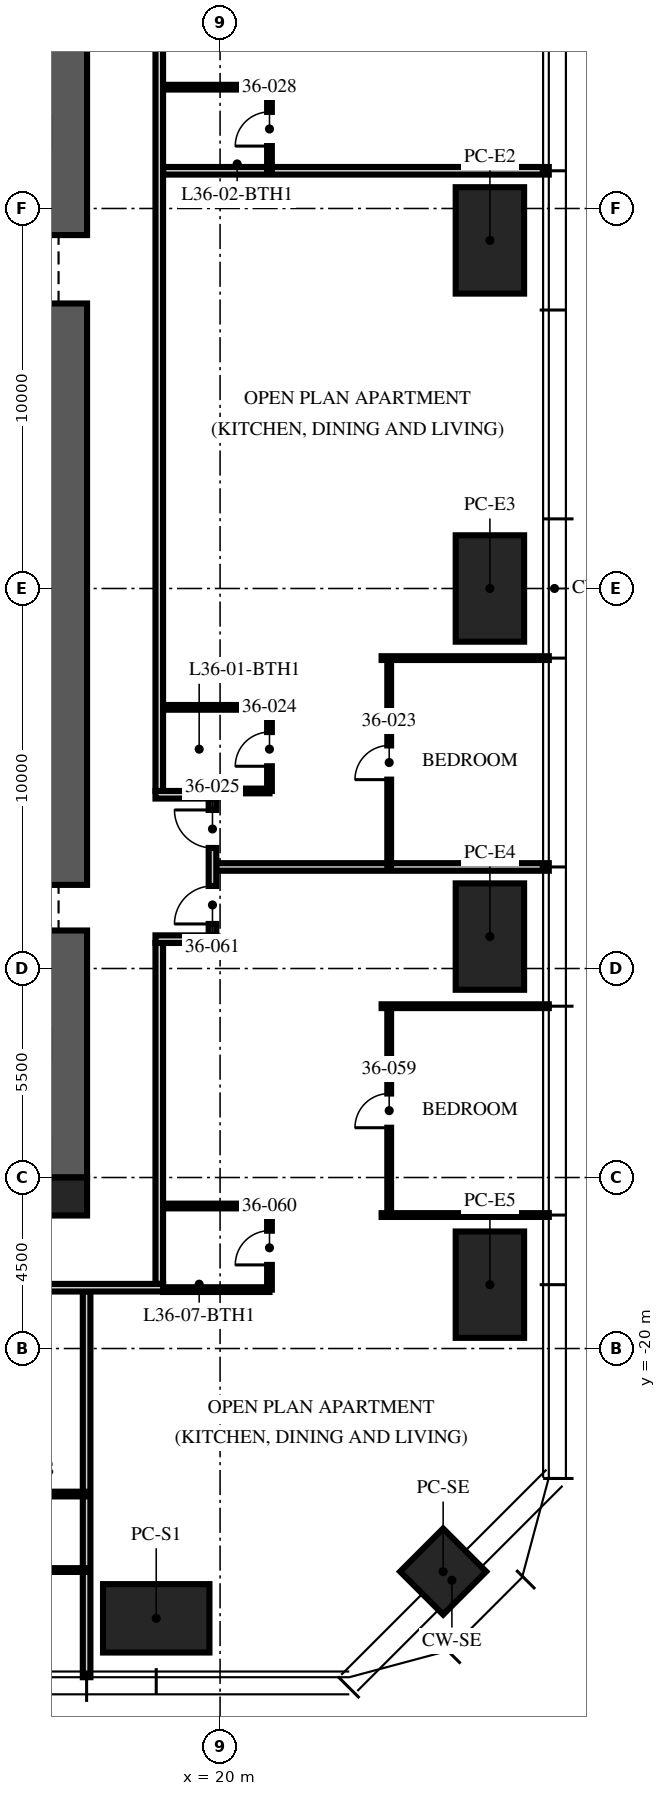
"""IFC4 building model, lengths in metres.
Left out: names, types, materials, properties, quantities, classifications, styles, units other than length and angle.
Written with IfcOpenShell. Run it as: python <this file> out.ifc"""

import sys

from ifc_helpers import new_model, si_unit, direction, frame, frame_2d, origin, origin_2d, place, context, subcontext, project, spatial, rectangle, extrude, element, fill, save


model = new_model("IFC4")
c1 = context("Model", 3, precision=1e-05, world=origin(), true_north=direction((0.0, 1.0)))
c2 = subcontext(c1, "Body", "Model", "MODEL_VIEW")
j1 = project(units=[si_unit("LENGTHUNIT", "METRE"), si_unit("PLANEANGLEUNIT", "RADIAN")], contexts=[c1])
p1 = place(None, origin())
s1 = spatial("IfcSite", under=j1, at=p1, CompositionType="ELEMENT")
p2 = place(p1, origin())
s2 = spatial("IfcBuilding", under=s1, at=p2, CompositionType="ELEMENT")
p3 = place(p2, frame((0.0, 0.0, 144.75)))
s3 = spatial("IfcBuildingStorey", under=s2, at=p3, CompositionType="ELEMENT", Elevation=144.75)
p4 = place(p3, frame((15.5, -15.5, -0.25), z_axis=(0.0, 0.0, 1.0), x_axis=(0.0, 1.0, 0.0)))
e1 = element("IfcWall", 1, at=p4, inside=s3, PredefinedType="SHEAR", context=c2, shape_type="SweptSolid", body=[
    extrude(rectangle(XDim=31.0, YDim=2.0, at=frame_2d((15.5, 0.0))), origin(), (0.0, 0.0, 1.0), 3.75),
])
p5 = place(p4, frame((6.5, 0.0, 0.25)))
e2 = element("IfcOpeningElement", 2, at=p5, cuts=e1, PredefinedType="OPENING", context=c2, shape_type="SweptSolid", body=[
    extrude(rectangle(XDim=1.2, YDim=2.1, at=frame_2d((0.6, 1.05))), frame((0.0, 1.01, 0.0), z_axis=(0.0, -1.0, 0.0), x_axis=(1.0, 0.0, 0.0)), (0.0, 0.0, 1.0), 2.02),
])
p6 = place(p4, frame((23.0, 0.0, 0.25)))
e3 = element("IfcOpeningElement", 3, at=p6, cuts=e1, PredefinedType="OPENING", context=c2, shape_type="SweptSolid", body=[
    extrude(rectangle(XDim=1.8, YDim=2.1, at=frame_2d((0.9, 1.05))), frame((0.0, 1.01, 0.0), z_axis=(0.0, -1.0, 0.0), x_axis=(1.0, 0.0, 0.0)), (0.0, 0.0, 1.0), 2.02),
])
p7 = place(p3, frame((16.0, -16.0, -0.25), z_axis=(0.0, 0.0, 1.0), x_axis=(1.0, 0.0, 0.0)))
e4 = element("IfcColumn", 4, at=p7, inside=s3, PredefinedType="COLUMN", context=c2, shape_type="SweptSolid", body=[
    extrude(rectangle(XDim=1.0, YDim=1.0, at=origin_2d()), origin(), (0.0, 0.0, 1.0), 3.75),
])
for number, where, z_axis, x_axis in (
    (5, (27.1, 9.16, 0.0), (0.0, 0.0, 1.0), (0.0, 1.0, 0.0)),
    (6, (27.1, 0.0, 0.0), (0.0, 0.0, 1.0), (0.0, 1.0, 0.0)),
    (7, (27.1, -9.16, 0.0), (0.0, 0.0, 1.0), (0.0, 1.0, 0.0)),
    (8, (27.1, -18.32, 0.0), (0.0, 0.0, 1.0), (0.0, 1.0, 0.0)),
    (9, (18.32, -27.1, 0.0), (0.0, 0.0, 1.0), (1.0, 0.0, 0.0)),
):
    element("IfcColumn", number, at=place(p3, frame(where, z_axis=z_axis, x_axis=x_axis)), inside=s3, PredefinedType="COLUMN", context=c2, shape_type="SweptSolid", body=[
        extrude(rectangle(XDim=2.8, YDim=1.8, at=origin_2d()), origin(), (0.0, 0.0, 1.0), 3.75),
    ])
p8 = place(p3, frame((25.87, -25.87, 0.0), z_axis=(0.0, 0.0, 1.0), x_axis=(0.707106781187, 0.707106781187, 0.0)))
e10 = element("IfcColumn", 10, at=p8, inside=s3, PredefinedType="COLUMN", context=c2, shape_type="SweptSolid", body=[
    extrude(rectangle(XDim=1.6, YDim=1.6, at=origin_2d()), origin(), (0.0, 0.0, 1.0), 3.75),
])
p9 = place(p3, frame((19.9, -7.328, 0.0), z_axis=(0.0, 0.0, 1.0), x_axis=(1.0, 0.0, 0.0)))
e11 = element("IfcWall", 11, at=p9, inside=s3, PredefinedType="PARTITIONING", context=c2, shape_type="SweptSolid", body=[
    extrude(rectangle(XDim=8.75, YDim=0.2, at=frame_2d((4.375, 0.0))), origin(), (0.0, 0.0, 1.0), 2.81),
])
p10 = place(p3, frame((24.25, -1.832, 0.0), z_axis=(0.0, 0.0, 1.0), x_axis=(1.0, 0.0, 0.0)))
e12 = element("IfcWall", 12, at=p10, inside=s3, PredefinedType="PARTITIONING", context=c2, shape_type="SweptSolid", body=[
    extrude(rectangle(XDim=4.4, YDim=0.1, at=frame_2d((2.2, 0.0))), origin(), (0.0, 0.0, 1.0), 2.81),
])
for number, where, z_axis, x_axis in (
    (13, (18.5, 10.992, 0.0), (0.0, 0.0, 1.0), (1.0, 0.0, 0.0)),
    (14, (16.488, -18.5, 0.0), (0.0, 0.0, 1.0), (0.0, -1.0, 0.0)),
):
    element("IfcWall", number, at=place(p3, frame(where, z_axis=z_axis, x_axis=x_axis)), inside=s3, PredefinedType="PARTITIONING", context=c2, shape_type="SweptSolid", body=[
        extrude(rectangle(XDim=10.15, YDim=0.2, at=frame_2d((5.075, 0.0))), origin(), (0.0, 0.0, 1.0), 2.81),
    ])
for number, where, z_axis, x_axis in (
    (15, (24.25, -16.488, 0.0), (0.0, 0.0, 1.0), (1.0, 0.0, 0.0)),
    (16, (24.25, -10.992, 0.0), (0.0, 0.0, 1.0), (1.0, 0.0, 0.0)),
):
    element("IfcWall", number, at=place(p3, frame(where, z_axis=z_axis, x_axis=x_axis)), inside=s3, PredefinedType="PARTITIONING", context=c2, shape_type="SweptSolid", body=[
        extrude(rectangle(XDim=4.4, YDim=0.1, at=frame_2d((2.2, 0.0))), origin(), (0.0, 0.0, 1.0), 2.81),
    ])
p11 = place(p3, frame((24.45, -7.328, 0.0), z_axis=(0.0, 0.0, 1.0), x_axis=(0.0, 1.0, 0.0)))
e17 = element("IfcWall", 17, at=p11, inside=s3, PredefinedType="PARTITIONING", context=c2, shape_type="SweptSolid", body=[
    extrude(rectangle(XDim=5.496, YDim=0.1, at=frame_2d((2.748, 0.0))), origin(), (0.0, 0.0, 1.0), 2.81),
])
p12 = place(p11, frame((2.298, 0.0, 0.0)))
e18 = element("IfcOpeningElement", 18, at=p12, cuts=e17, PredefinedType="OPENING", context=c2, shape_type="SweptSolid", body=[
    extrude(rectangle(XDim=0.9, YDim=2.1, at=frame_2d((0.45, 1.05))), frame((0.0, 0.06, 0.0), z_axis=(0.0, -1.0, 0.0), x_axis=(1.0, 0.0, 0.0)), (0.0, 0.0, 1.0), 0.12),
])
p13 = place(p3, frame((21.3, -5.328, 0.0), z_axis=(0.0, 0.0, 1.0), x_axis=(0.0, 1.0, 0.0)))
e19 = element("IfcWall", 19, at=p13, inside=s3, PredefinedType="PARTITIONING", context=c2, shape_type="SweptSolid", body=[
    extrude(rectangle(XDim=2.2, YDim=0.125, at=frame_2d((1.1, 0.0))), origin(), (0.0, 0.0, 1.0), 2.81),
])
p14 = place(p13, frame((0.65, 0.0, 0.0)))
e20 = element("IfcOpeningElement", 20, at=p14, cuts=e19, PredefinedType="OPENING", context=c2, shape_type="SweptSolid", body=[
    extrude(rectangle(XDim=0.9, YDim=2.1, at=frame_2d((0.45, 1.05))), frame((0.0, 0.073, 0.0), z_axis=(0.0, -1.0, 0.0), x_axis=(1.0, 0.0, 0.0)), (0.0, 0.0, 1.0), 0.145),
])
p15 = place(p3, frame((19.97, -5.328, 0.0), z_axis=(0.0, 0.0, 1.0), x_axis=(1.0, 0.0, 0.0)))
e21 = element("IfcWall", 21, at=p15, inside=s3, PredefinedType="PARTITIONING", context=c2, shape_type="SweptSolid", body=[
    extrude(rectangle(XDim=1.33, YDim=0.125, at=frame_2d((0.665, 0.0))), origin(), (0.0, 0.0, 1.0), 3.5),
])
p16 = place(p3, frame((18.5, -3.128, 0.0), z_axis=(0.0, 0.0, 1.0), x_axis=(1.0, 0.0, 0.0)))
e22 = element("IfcWall", 22, at=p16, inside=s3, PredefinedType="PARTITIONING", context=c2, shape_type="SweptSolid", body=[
    extrude(rectangle(XDim=2.8, YDim=0.125, at=frame_2d((1.4, 0.0))), origin(), (0.0, 0.0, 1.0), 3.5),
])
p17 = place(p3, frame((21.3, 10.992, 0.0), z_axis=(0.0, 0.0, 1.0), x_axis=(0.0, 1.0, 0.0)))
e23 = element("IfcWall", 23, at=p17, inside=s3, PredefinedType="PARTITIONING", context=c2, shape_type="SweptSolid", body=[
    extrude(rectangle(XDim=2.2, YDim=0.125, at=frame_2d((1.1, 0.0))), origin(), (0.0, 0.0, 1.0), 3.5),
])
p18 = place(p17, frame((0.65, 0.0, 0.0)))
e24 = element("IfcOpeningElement", 24, at=p18, cuts=e23, PredefinedType="OPENING", context=c2, shape_type="SweptSolid", body=[
    extrude(rectangle(XDim=0.9, YDim=2.1, at=frame_2d((0.45, 1.05))), frame((0.0, 0.073, 0.0), z_axis=(0.0, -1.0, 0.0), x_axis=(1.0, 0.0, 0.0)), (0.0, 0.0, 1.0), 0.145),
])
p19 = place(p3, frame((18.5, 13.192, 0.0), z_axis=(0.0, 0.0, 1.0), x_axis=(1.0, 0.0, 0.0)))
e25 = element("IfcWall", 25, at=p19, inside=s3, PredefinedType="PARTITIONING", context=c2, shape_type="SweptSolid", body=[
    extrude(rectangle(XDim=2.8, YDim=0.125, at=frame_2d((1.4, 0.0))), origin(), (0.0, 0.0, 1.0), 3.5),
])
p20 = place(p3, frame((10.992, -25.83, 0.0), z_axis=(0.0, 0.0, 1.0), x_axis=(1.0, 0.0, 0.0)))
e26 = element("IfcWall", 26, at=p20, inside=s3, PredefinedType="PARTITIONING", context=c2, shape_type="SweptSolid", body=[
    extrude(rectangle(XDim=5.496, YDim=0.1, at=frame_2d((2.748, 0.0))), origin(), (0.0, 0.0, 1.0), 2.81),
])
p21 = place(p20, frame((0.15, 0.0, 0.0)))
e27 = element("IfcOpeningElement", 27, at=p21, cuts=e26, PredefinedType="OPENING", context=c2, shape_type="SweptSolid", body=[
    extrude(rectangle(XDim=0.9, YDim=2.1, at=frame_2d((0.45, 1.05))), frame((0.0, 0.06, 0.0), z_axis=(0.0, -1.0, 0.0), x_axis=(1.0, 0.0, 0.0)), (0.0, 0.0, 1.0), 0.12),
])
p22 = place(p20, frame((2.898, 0.0, 0.0)))
e28 = element("IfcOpeningElement", 28, at=p22, cuts=e26, PredefinedType="OPENING", context=c2, shape_type="SweptSolid", body=[
    extrude(rectangle(XDim=0.9, YDim=2.1, at=frame_2d((0.45, 1.05))), frame((0.0, 0.06, 0.0), z_axis=(0.0, -1.0, 0.0), x_axis=(1.0, 0.0, 0.0)), (0.0, 0.0, 1.0), 0.12),
])
p23 = place(p3, frame((12.192, -23.83, 0.0), z_axis=(0.0, 0.0, 1.0), x_axis=(1.0, 0.0, 0.0)))
e29 = element("IfcWall", 29, at=p23, inside=s3, PredefinedType="PARTITIONING", context=c2, shape_type="SweptSolid", body=[
    extrude(rectangle(XDim=4.296, YDim=0.125, at=frame_2d((2.148, 0.0))), origin(), (0.0, 0.0, 1.0), 2.81),
])
p24 = place(p3, frame((24.45, -16.488, 0.0), z_axis=(0.0, 0.0, 1.0), x_axis=(0.0, 1.0, 0.0)))
e30 = element("IfcWall", 30, at=p24, inside=s3, PredefinedType="PARTITIONING", context=c2, shape_type="SweptSolid", body=[
    extrude(rectangle(XDim=5.496, YDim=0.1, at=frame_2d((2.748, 0.0))), origin(), (0.0, 0.0, 1.0), 2.81),
])
p25 = place(p24, frame((2.298, 0.0, 0.0)))
e31 = element("IfcOpeningElement", 31, at=p25, cuts=e30, PredefinedType="OPENING", context=c2, shape_type="SweptSolid", body=[
    extrude(rectangle(XDim=0.9, YDim=2.1, at=frame_2d((0.45, 1.05))), frame((0.0, 0.06, 0.0), z_axis=(0.0, -1.0, 0.0), x_axis=(1.0, 0.0, 0.0)), (0.0, 0.0, 1.0), 0.12),
])
p26 = place(p3, frame((21.3, -18.45, 0.0), z_axis=(0.0, 0.0, 1.0), x_axis=(0.0, 1.0, 0.0)))
e32 = element("IfcWall", 32, at=p26, inside=s3, PredefinedType="PARTITIONING", context=c2, shape_type="SweptSolid", body=[
    extrude(rectangle(XDim=2.2, YDim=0.125, at=frame_2d((1.1, 0.0))), origin(), (0.0, 0.0, 1.0), 2.7),
])
p27 = place(p26, frame((0.65, 0.0, 0.0)))
e33 = element("IfcOpeningElement", 33, at=p27, cuts=e32, PredefinedType="OPENING", context=c2, shape_type="SweptSolid", body=[
    extrude(rectangle(XDim=0.9, YDim=2.1, at=frame_2d((0.45, 1.05))), frame((0.0, 0.073, 0.0), z_axis=(0.0, -1.0, 0.0), x_axis=(1.0, 0.0, 0.0)), (0.0, 0.0, 1.0), 0.145),
])
p28 = place(p3, frame((18.5, -18.45, 0.0), z_axis=(0.0, 0.0, 1.0), x_axis=(1.0, 0.0, 0.0)))
e34 = element("IfcWall", 34, at=p28, inside=s3, PredefinedType="PARTITIONING", context=c2, shape_type="SweptSolid", body=[
    extrude(rectangle(XDim=2.8, YDim=0.125, at=frame_2d((1.4, 0.0))), origin(), (0.0, 0.0, 1.0), 2.3),
])
p29 = place(p3, frame((18.5, -16.25, 0.0), z_axis=(0.0, 0.0, 1.0), x_axis=(1.0, 0.0, 0.0)))
e35 = element("IfcWall", 35, at=p29, inside=s3, PredefinedType="PARTITIONING", context=c2, shape_type="SweptSolid", body=[
    extrude(rectangle(XDim=2.8, YDim=0.125, at=frame_2d((1.4, 0.0))), origin(), (0.0, 0.0, 1.0), 3.5),
])
p30 = place(p3, frame((18.4, -18.3, 0.0), z_axis=(0.0, 0.0, 1.0), x_axis=(0.0, 1.0, 0.0)))
e36 = element("IfcWall", 36, at=p30, inside=s3, PredefinedType="PARTITIONING", context=c2, shape_type="SweptSolid", body=[
    extrude(rectangle(XDim=8.972, YDim=0.2, at=frame_2d((4.486, 0.0))), origin(), (0.0, 0.0, 1.0), 2.3),
])
p31 = place(p3, frame((18.3, -9.228, 0.0), z_axis=(0.0, 0.0, 1.0), x_axis=(1.0, 0.0, 0.0)))
e37 = element("IfcWall", 37, at=p31, inside=s3, PredefinedType="PARTITIONING", context=c2, shape_type="SweptSolid", body=[
    extrude(rectangle(XDim=1.6, YDim=0.2, at=frame_2d((0.8, 0.0))), origin(), (0.0, 0.0, 1.0), 2.7),
])
p32 = place(p3, frame((18.3, -5.428, 0.0), z_axis=(0.0, 0.0, 1.0), x_axis=(1.0, 0.0, 0.0)))
e38 = element("IfcWall", 38, at=p32, inside=s3, PredefinedType="PARTITIONING", context=c2, shape_type="SweptSolid", body=[
    extrude(rectangle(XDim=1.6, YDim=0.2, at=frame_2d((0.8, 0.0))), origin(), (0.0, 0.0, 1.0), 3.5),
])
p33 = place(p3, frame((19.8, -9.128, 0.0), z_axis=(0.0, 0.0, 1.0), x_axis=(0.0, 1.0, 0.0)))
e39 = element("IfcWall", 39, at=p33, inside=s3, PredefinedType="PARTITIONING", context=c2, shape_type="SweptSolid", body=[
    extrude(rectangle(XDim=3.6, YDim=0.2, at=frame_2d((1.8, 0.0))), origin(), (0.0, 0.0, 1.0), 2.7),
])
p34 = place(p33, frame((2.3, 0.0, 0.0)))
e40 = element("IfcOpeningElement", 40, at=p34, cuts=e39, PredefinedType="OPENING", context=c2, shape_type="SweptSolid", body=[
    extrude(rectangle(XDim=1.0, YDim=2.2, at=frame_2d((0.5, 1.1))), frame((0.0, 0.11, 0.0), z_axis=(0.0, -1.0, 0.0), x_axis=(1.0, 0.0, 0.0)), (0.0, 0.0, 1.0), 0.22),
])
p35 = place(p33, frame((0.3, 0.0, 0.0)))
e41 = element("IfcOpeningElement", 41, at=p35, cuts=e39, PredefinedType="OPENING", context=c2, shape_type="SweptSolid", body=[
    extrude(rectangle(XDim=1.0, YDim=2.2, at=frame_2d((0.5, 1.1))), frame((0.0, 0.11, 0.0), z_axis=(0.0, -1.0, 0.0), x_axis=(1.0, 0.0, 0.0)), (0.0, 0.0, 1.0), 0.22),
])
p36 = place(p3, frame((18.4, -5.328, 0.0), z_axis=(0.0, 0.0, 1.0), x_axis=(0.0, 1.0, 0.0)))
e42 = element("IfcWall", 42, at=p36, inside=s3, PredefinedType="PARTITIONING", context=c2, shape_type="SweptSolid", body=[
    extrude(rectangle(XDim=22.028, YDim=0.2, at=frame_2d((11.014, 0.0))), origin(), (0.0, 0.0, 1.0), 2.7),
])
p37 = place(p36, frame((19.84, 0.0, 0.0)))
e43 = element("IfcOpeningElement", 43, at=p37, cuts=e42, PredefinedType="OPENING", context=c2, shape_type="SweptSolid", body=[
    extrude(rectangle(XDim=1.0, YDim=2.2, at=frame_2d((0.5, 1.1))), frame((0.0, 0.11, 0.0), z_axis=(0.0, -1.0, 0.0), x_axis=(1.0, 0.0, 0.0)), (0.0, 0.0, 1.0), 0.22),
])
p38 = place(p3, frame((18.5, -18.4, 0.0), z_axis=(0.0, 0.0, 1.0), x_axis=(-1.0, 0.0, 0.0)))
e44 = element("IfcWall", 44, at=p38, inside=s3, PredefinedType="PARTITIONING", context=c2, shape_type="SweptSolid", body=[
    extrude(rectangle(XDim=12.9, YDim=0.2, at=frame_2d((6.45, 0.0))), origin(), (0.0, 0.0, 1.0), 2.3),
])
p39 = place(p12, origin())
e45 = element("IfcDoor", 45, at=p39, inside=s3, OperationType="SINGLE_SWING_LEFT", PredefinedType="DOOR", context=c2, shape_type="SweptSolid", body=[
    extrude(rectangle(XDim=0.9, YDim=2.1, at=frame_2d((0.45, 1.05))), frame((0.0, 0.025, 0.0), z_axis=(0.0, -1.0, 0.0), x_axis=(1.0, 0.0, 0.0)), (0.0, 0.0, 1.0), 0.05),
])
fill(e18, e45)
p40 = place(p14, origin())
e46 = element("IfcDoor", 46, at=p40, inside=s3, OperationType="SINGLE_SWING_LEFT", PredefinedType="DOOR", context=c2, shape_type="SweptSolid", body=[
    extrude(rectangle(XDim=0.9, YDim=2.1, at=frame_2d((0.45, 1.05))), frame((0.0, 0.025, 0.0), z_axis=(0.0, -1.0, 0.0), x_axis=(1.0, 0.0, 0.0)), (0.0, 0.0, 1.0), 0.05),
])
fill(e20, e46)
p41 = place(p34, origin())
e47 = element("IfcDoor", 47, at=p41, inside=s3, OperationType="SINGLE_SWING_RIGHT", PredefinedType="DOOR", context=c2, shape_type="SweptSolid", body=[
    extrude(rectangle(XDim=1.0, YDim=2.2, at=frame_2d((0.5, 1.1))), frame((0.0, 0.025, 0.0), z_axis=(0.0, -1.0, 0.0), x_axis=(1.0, 0.0, 0.0)), (0.0, 0.0, 1.0), 0.05),
])
fill(e40, e47)
p42 = place(p18, origin())
e48 = element("IfcDoor", 48, at=p42, inside=s3, OperationType="SINGLE_SWING_LEFT", PredefinedType="DOOR", context=c2, shape_type="SweptSolid", body=[
    extrude(rectangle(XDim=0.9, YDim=2.1, at=frame_2d((0.45, 1.05))), frame((0.0, 0.025, 0.0), z_axis=(0.0, -1.0, 0.0), x_axis=(1.0, 0.0, 0.0)), (0.0, 0.0, 1.0), 0.05),
])
fill(e24, e48)
p43 = place(p25, origin())
e49 = element("IfcDoor", 49, at=p43, inside=s3, OperationType="SINGLE_SWING_LEFT", PredefinedType="DOOR", context=c2, shape_type="SweptSolid", body=[
    extrude(rectangle(XDim=0.9, YDim=2.1, at=frame_2d((0.45, 1.05))), frame((0.0, 0.025, 0.0), z_axis=(0.0, -1.0, 0.0), x_axis=(1.0, 0.0, 0.0)), (0.0, 0.0, 1.0), 0.05),
])
fill(e31, e49)
p44 = place(p27, origin())
e50 = element("IfcDoor", 50, at=p44, inside=s3, OperationType="SINGLE_SWING_LEFT", PredefinedType="DOOR", context=c2, shape_type="SweptSolid", body=[
    extrude(rectangle(XDim=0.9, YDim=2.1, at=frame_2d((0.45, 1.05))), frame((0.0, 0.025, 0.0), z_axis=(0.0, -1.0, 0.0), x_axis=(1.0, 0.0, 0.0)), (0.0, 0.0, 1.0), 0.05),
])
fill(e33, e50)
p45 = place(p35, origin())
e51 = element("IfcDoor", 51, at=p45, inside=s3, OperationType="SINGLE_SWING_LEFT", PredefinedType="DOOR", context=c2, shape_type="SweptSolid", body=[
    extrude(rectangle(XDim=1.0, YDim=2.2, at=frame_2d((0.5, 1.1))), frame((0.0, 0.025, 0.0), z_axis=(0.0, -1.0, 0.0), x_axis=(1.0, 0.0, 0.0)), (0.0, 0.0, 1.0), 0.05),
])
fill(e41, e51)
save(model, sys.argv[1])
